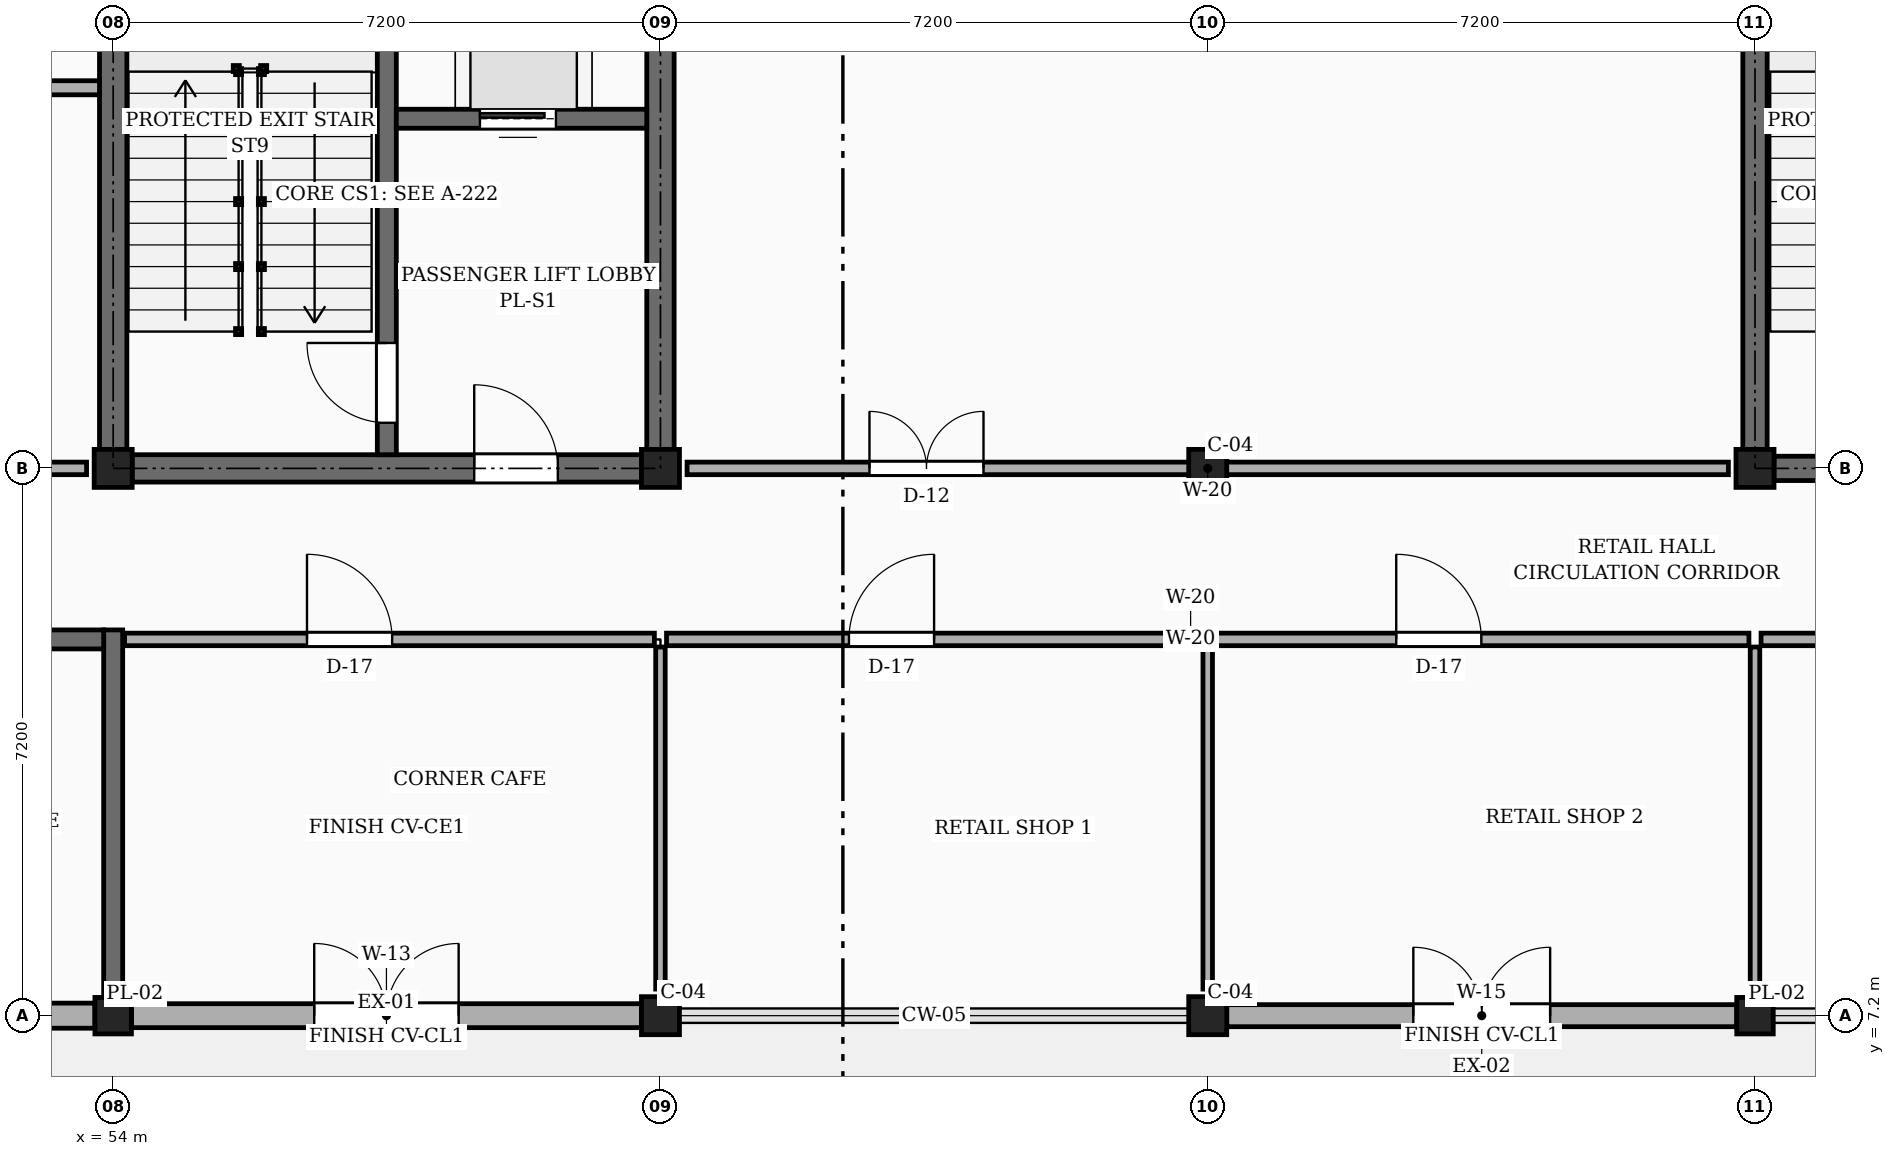
"""IFC4 building model, lengths in metres.
Left out: names, types, materials, properties, quantities, classifications, styles, units other than length and angle.
Written with IfcOpenShell. Run it as: python <this file> out.ifc"""

import sys

from ifc_helpers import new_model, si_unit, direction, frame, frame_2d, origin, origin_2d, place, context, subcontext, project, spatial, rectangle, extrude, element, fill, save


model = new_model("IFC4")
c1 = context("Model", 3, precision=1e-05, world=origin(), true_north=direction((0.0, 1.0)))
c2 = subcontext(c1, "Body", "Model", "MODEL_VIEW")
j1 = project(units=[si_unit("LENGTHUNIT", "METRE"), si_unit("PLANEANGLEUNIT", "RADIAN")], contexts=[c1])
p1 = place(None, origin())
s1 = spatial("IfcSite", under=j1, at=p1, CompositionType="ELEMENT")
p2 = place(p1, origin())
s2 = spatial("IfcBuilding", under=s1, at=p2, CompositionType="ELEMENT")
p3 = place(p2, origin())
s3 = spatial("IfcBuildingStorey", under=s2, at=p3, CompositionType="ELEMENT", Elevation=0.0)
p4 = place(p3, frame((54.0, 7.2, 0.0), z_axis=(0.0, 0.0, 1.0), x_axis=(1.0, 0.0, 0.0)))
e1 = element("IfcColumn", 1, at=p4, inside=s3, PredefinedType="PILASTER", context=c2, shape_type="SweptSolid", body=[
    extrude(rectangle(XDim=0.48, YDim=0.48, at=origin_2d()), origin(), (0.0, 0.0, 1.0), 4.5),
])
for number, where, z_axis, x_axis in (
    (2, (54.0, 14.4, 0.0), (0.0, 0.0, 1.0), (1.0, 0.0, 0.0)),
    (3, (61.2, 7.2, 0.0), (0.0, 0.0, 1.0), (1.0, 0.0, 0.0)),
    (4, (61.2, 14.4, 0.0), (0.0, 0.0, 1.0), (1.0, 0.0, 0.0)),
    (5, (68.4, 7.2, 0.0), (0.0, 0.0, 1.0), (1.0, 0.0, 0.0)),
    (6, (68.4, 14.4, 0.0), (0.0, 0.0, 1.0), (1.0, 0.0, 0.0)),
):
    element("IfcColumn", number, at=place(p3, frame(where, z_axis=z_axis, x_axis=x_axis)), inside=s3, PredefinedType="COLUMN", context=c2, shape_type="SweptSolid", body=[
        extrude(rectangle(XDim=0.5, YDim=0.5, at=origin_2d()), origin(), (0.0, 0.0, 1.0), 4.5),
    ])
p5 = place(p3, frame((75.6, 7.2, 0.0), z_axis=(0.0, 0.0, 1.0), x_axis=(1.0, 0.0, 0.0)))
e7 = element("IfcColumn", 7, at=p5, inside=s3, PredefinedType="PILASTER", context=c2, shape_type="SweptSolid", body=[
    extrude(rectangle(XDim=0.48, YDim=0.48, at=origin_2d()), origin(), (0.0, 0.0, 1.0), 4.5),
])
p6 = place(p3, frame((75.6, 14.4, 0.0), z_axis=(0.0, 0.0, 1.0), x_axis=(1.0, 0.0, 0.0)))
e8 = element("IfcColumn", 8, at=p6, inside=s3, PredefinedType="COLUMN", context=c2, shape_type="SweptSolid", body=[
    extrude(rectangle(XDim=0.5, YDim=0.5, at=origin_2d()), origin(), (0.0, 0.0, 1.0), 4.5),
])
p7 = place(p3, frame((47.05, 7.2, 0.0), z_axis=(0.0, 0.0, 1.0), x_axis=(1.0, 0.0, 0.0)))
e9 = element("IfcWall", 9, at=p7, inside=s3, PredefinedType="SOLIDWALL", context=c2, shape_type="SweptSolid", body=[
    extrude(rectangle(XDim=6.71, YDim=0.33, at=frame_2d((3.355, 0.0))), origin(), (0.0, 0.0, 1.0), 3.83),
])
p8 = place(p7, frame((2.5, 0.0, 0.0)))
e10 = element("IfcOpeningElement", 10, at=p8, cuts=e9, PredefinedType="OPENING", context=c2, shape_type="SweptSolid", body=[
    extrude(rectangle(XDim=1.06, YDim=2.15, at=frame_2d((0.53, 1.075))), frame((0.0, 0.175, 0.0), z_axis=(0.0, -1.0, 0.0), x_axis=(1.0, 0.0, 0.0)), (0.0, 0.0, 1.0), 0.35),
])
p9 = place(p3, frame((54.24, 7.2, 0.0), z_axis=(0.0, 0.0, 1.0), x_axis=(1.0, 0.0, 0.0)))
e11 = element("IfcWall", 11, at=p9, inside=s3, PredefinedType="SOLIDWALL", context=c2, shape_type="SweptSolid", body=[
    extrude(rectangle(XDim=6.71, YDim=0.315, at=frame_2d((3.355, 0.0))), origin(), (0.0, 0.0, 1.0), 3.83),
])
p10 = place(p9, frame((2.405, 0.0, 0.0)))
e12 = element("IfcOpeningElement", 12, at=p10, cuts=e11, PredefinedType="OPENING", context=c2, shape_type="SweptSolid", body=[
    extrude(rectangle(XDim=1.9, YDim=2.2, at=frame_2d((0.95, 1.1))), frame((0.0, 0.167, 0.0), z_axis=(0.0, -1.0, 0.0), x_axis=(1.0, 0.0, 0.0)), (0.0, 0.0, 1.0), 0.335),
])
p11 = place(p3, frame((68.65, 7.2, 0.0), z_axis=(0.0, 0.0, 1.0), x_axis=(1.0, 0.0, 0.0)))
e13 = element("IfcWall", 13, at=p11, inside=s3, PredefinedType="SOLIDWALL", context=c2, shape_type="SweptSolid", body=[
    extrude(rectangle(XDim=6.71, YDim=0.29, at=frame_2d((3.355, 0.0))), origin(), (0.0, 0.0, 1.0), 3.83),
])
p12 = place(p11, frame((2.455, 0.0, 0.0)))
e14 = element("IfcOpeningElement", 14, at=p12, cuts=e13, PredefinedType="OPENING", context=c2, shape_type="SweptSolid", body=[
    extrude(rectangle(XDim=1.8, YDim=2.2, at=frame_2d((0.9, 1.1))), frame((0.0, 0.155, 0.0), z_axis=(0.0, -1.0, 0.0), x_axis=(1.0, 0.0, 0.0)), (0.0, 0.0, 1.0), 0.31),
])
p13 = place(p3, frame((54.0, 14.65, 0.0), z_axis=(0.0, 0.0, 1.0), x_axis=(0.0, 1.0, 0.0)))
e15 = element("IfcWall", 15, at=p13, inside=s3, PredefinedType="SHEAR", context=c2, shape_type="SweptSolid", body=[
    extrude(rectangle(XDim=6.7, YDim=0.36, at=frame_2d((3.35, 0.0))), origin(), (0.0, 0.0, 1.0), 4.26),
])
p14 = place(p13, frame((5.335, 0.0, 0.0)))
e16 = element("IfcOpeningElement", 16, at=p14, cuts=e15, PredefinedType="OPENING", context=c2, shape_type="SweptSolid", body=[
    extrude(rectangle(XDim=1.0, YDim=2.15, at=frame_2d((0.5, 1.075))), frame((0.0, 0.19, 0.0), z_axis=(0.0, -1.0, 0.0), x_axis=(1.0, 0.0, 0.0)), (0.0, 0.0, 1.0), 0.38),
])
p15 = place(p3, frame((61.2, 14.65, 0.0), z_axis=(0.0, 0.0, 1.0), x_axis=(0.0, 1.0, 0.0)))
e17 = element("IfcWall", 17, at=p15, inside=s3, PredefinedType="SHEAR", context=c2, shape_type="SweptSolid", body=[
    extrude(rectangle(XDim=6.7, YDim=0.36, at=frame_2d((3.35, 0.0))), origin(), (0.0, 0.0, 1.0), 4.26),
])
p16 = place(p3, frame((54.25, 14.4, 0.0), z_axis=(0.0, 0.0, 1.0), x_axis=(1.0, 0.0, 0.0)))
e18 = element("IfcWall", 18, at=p16, inside=s3, PredefinedType="SHEAR", context=c2, shape_type="SweptSolid", body=[
    extrude(rectangle(XDim=6.7, YDim=0.36, at=frame_2d((3.35, 0.0))), origin(), (0.0, 0.0, 1.0), 4.26),
])
p17 = place(p16, frame((4.5, 0.0, 0.0)))
e19 = element("IfcOpeningElement", 19, at=p17, cuts=e18, PredefinedType="OPENING", context=c2, shape_type="SweptSolid", body=[
    extrude(rectangle(XDim=1.1, YDim=2.15, at=frame_2d((0.55, 1.075))), frame((0.0, 0.19, 0.0), z_axis=(0.0, -1.0, 0.0), x_axis=(1.0, 0.0, 0.0)), (0.0, 0.0, 1.0), 0.38),
])
p18 = place(p3, frame((57.6, 14.58, 0.0), z_axis=(0.0, 0.0, 1.0), x_axis=(0.0, 1.0, 0.0)))
e20 = element("IfcWall", 20, at=p18, inside=s3, PredefinedType="SHEAR", context=c2, shape_type="SweptSolid", body=[
    extrude(rectangle(XDim=6.84, YDim=0.25, at=frame_2d((3.42, 0.0))), origin(), (0.0, 0.0, 1.0), 4.26),
])
p19 = place(p18, frame((0.42, 0.0, 0.0)))
e21 = element("IfcOpeningElement", 21, at=p19, cuts=e20, PredefinedType="OPENING", context=c2, shape_type="SweptSolid", body=[
    extrude(rectangle(XDim=1.05, YDim=2.15, at=frame_2d((0.525, 1.075))), frame((0.0, 0.135, 0.0), z_axis=(0.0, -1.0, 0.0), x_axis=(1.0, 0.0, 0.0)), (0.0, 0.0, 1.0), 0.27),
])
p20 = place(p3, frame((57.725, 19.0, 0.0), z_axis=(0.0, 0.0, 1.0), x_axis=(1.0, 0.0, 0.0)))
e22 = element("IfcWall", 22, at=p20, inside=s3, PredefinedType="SHEAR", context=c2, shape_type="SweptSolid", body=[
    extrude(rectangle(XDim=3.295, YDim=0.25, at=frame_2d((1.647, 0.0))), origin(), (0.0, 0.0, 1.0), 4.26),
])
p21 = place(p20, frame((1.1, 0.0, 0.0)))
e23 = element("IfcOpeningElement", 23, at=p21, cuts=e22, PredefinedType="OPENING", context=c2, shape_type="SweptSolid", body=[
    extrude(rectangle(XDim=1.0, YDim=2.2, at=frame_2d((0.5, 1.1))), frame((0.0, 0.135, 0.0), z_axis=(0.0, -1.0, 0.0), x_axis=(1.0, 0.0, 0.0)), (0.0, 0.0, 1.0), 0.27),
])
p22 = place(p3, frame((75.6, 14.65, 0.0), z_axis=(0.0, 0.0, 1.0), x_axis=(0.0, 1.0, 0.0)))
e24 = element("IfcWall", 24, at=p22, inside=s3, PredefinedType="SHEAR", context=c2, shape_type="SweptSolid", body=[
    extrude(rectangle(XDim=6.7, YDim=0.32, at=frame_2d((3.35, 0.0))), origin(), (0.0, 0.0, 1.0), 4.26),
])
p23 = place(p3, frame((75.85, 14.4, 0.0), z_axis=(0.0, 0.0, 1.0), x_axis=(1.0, 0.0, 0.0)))
e25 = element("IfcWall", 25, at=p23, inside=s3, PredefinedType="SHEAR", context=c2, shape_type="SweptSolid", body=[
    extrude(rectangle(XDim=3.19, YDim=0.32, at=frame_2d((1.595, 0.0))), origin(), (0.0, 0.0, 1.0), 4.26),
])
p24 = place(p23, frame((1.0, 0.0, 0.0)))
e26 = element("IfcOpeningElement", 26, at=p24, cuts=e25, PredefinedType="OPENING", context=c2, shape_type="SweptSolid", body=[
    extrude(rectangle(XDim=1.05, YDim=2.15, at=frame_2d((0.525, 1.075))), frame((0.0, 0.17, 0.0), z_axis=(0.0, -1.0, 0.0), x_axis=(1.0, 0.0, 0.0)), (0.0, 0.0, 1.0), 0.34),
])
p25 = place(p3, frame((54.0, 7.45, 0.0), z_axis=(0.0, 0.0, 1.0), x_axis=(0.0, 1.0, 0.0)))
e27 = element("IfcWall", 27, at=p25, inside=s3, PredefinedType="SHEAR", context=c2, shape_type="SweptSolid", body=[
    extrude(rectangle(XDim=4.825, YDim=0.25, at=frame_2d((2.413, 0.0))), origin(), (0.0, 0.0, 1.0), 3.41),
])
p26 = place(p3, frame((46.975, 12.15, 0.0), z_axis=(0.0, 0.0, 1.0), x_axis=(1.0, 0.0, 0.0)))
e28 = element("IfcWall", 28, at=p26, inside=s3, PredefinedType="SHEAR", context=c2, shape_type="SweptSolid", body=[
    extrude(rectangle(XDim=6.9, YDim=0.25, at=frame_2d((3.45, 0.0))), origin(), (0.0, 0.0, 1.0), 3.41),
])
p27 = place(p26, frame((2.4, 0.0, 0.0)))
e29 = element("IfcOpeningElement", 29, at=p27, cuts=e28, PredefinedType="OPENING", context=c2, shape_type="SweptSolid", body=[
    extrude(rectangle(XDim=1.0, YDim=2.15, at=frame_2d((0.5, 1.075))), frame((0.0, 0.135, 0.0), z_axis=(0.0, -1.0, 0.0), x_axis=(1.0, 0.0, 0.0)), (0.0, 0.0, 1.0), 0.27),
])
p28 = place(p3, frame((54.15, 12.15, 0.0), z_axis=(0.0, 0.0, 1.0), x_axis=(1.0, 0.0, 0.0)))
e30 = element("IfcWall", 30, at=p28, inside=s3, PredefinedType="PARTITIONING", context=c2, shape_type="SweptSolid", body=[
    extrude(rectangle(XDim=6.97, YDim=0.165, at=frame_2d((3.485, 0.0))), origin(), (0.0, 0.0, 1.0), 3.41),
])
p29 = place(p28, frame((2.4, 0.0, 0.0)))
e31 = element("IfcOpeningElement", 31, at=p29, cuts=e30, PredefinedType="OPENING", context=c2, shape_type="SweptSolid", body=[
    extrude(rectangle(XDim=1.12, YDim=2.18, at=frame_2d((0.56, 1.09))), frame((0.0, 0.093, 0.0), z_axis=(0.0, -1.0, 0.0), x_axis=(1.0, 0.0, 0.0)), (0.0, 0.0, 1.0), 0.185),
])
p30 = place(p3, frame((61.28, 12.15, 0.0), z_axis=(0.0, 0.0, 1.0), x_axis=(1.0, 0.0, 0.0)))
e32 = element("IfcWall", 32, at=p30, inside=s3, PredefinedType="PARTITIONING", context=c2, shape_type="SweptSolid", body=[
    extrude(rectangle(XDim=7.04, YDim=0.165, at=frame_2d((3.52, 0.0))), origin(), (0.0, 0.0, 1.0), 3.41),
])
p31 = place(p30, frame((2.4, 0.0, 0.0)))
e33 = element("IfcOpeningElement", 33, at=p31, cuts=e32, PredefinedType="OPENING", context=c2, shape_type="SweptSolid", body=[
    extrude(rectangle(XDim=1.12, YDim=2.18, at=frame_2d((0.56, 1.09))), frame((0.0, 0.093, 0.0), z_axis=(0.0, -1.0, 0.0), x_axis=(1.0, 0.0, 0.0)), (0.0, 0.0, 1.0), 0.185),
])
p32 = place(p3, frame((68.48, 12.15, 0.0), z_axis=(0.0, 0.0, 1.0), x_axis=(1.0, 0.0, 0.0)))
e34 = element("IfcWall", 34, at=p32, inside=s3, PredefinedType="PARTITIONING", context=c2, shape_type="SweptSolid", body=[
    extrude(rectangle(XDim=7.04, YDim=0.165, at=frame_2d((3.52, 0.0))), origin(), (0.0, 0.0, 1.0), 3.41),
])
p33 = place(p32, frame((2.4, 0.0, 0.0)))
e35 = element("IfcOpeningElement", 35, at=p33, cuts=e34, PredefinedType="OPENING", context=c2, shape_type="SweptSolid", body=[
    extrude(rectangle(XDim=1.12, YDim=2.18, at=frame_2d((0.56, 1.09))), frame((0.0, 0.093, 0.0), z_axis=(0.0, -1.0, 0.0), x_axis=(1.0, 0.0, 0.0)), (0.0, 0.0, 1.0), 0.185),
])
p34 = place(p3, frame((75.68, 12.15, 0.0), z_axis=(0.0, 0.0, 1.0), x_axis=(1.0, 0.0, 0.0)))
e36 = element("IfcWall", 36, at=p34, inside=s3, PredefinedType="PARTITIONING", context=c2, shape_type="SweptSolid", body=[
    extrude(rectangle(XDim=7.04, YDim=0.165, at=frame_2d((3.52, 0.0))), origin(), (0.0, 0.0, 1.0), 3.41),
])
p35 = place(p34, frame((2.4, 0.0, 0.0)))
e37 = element("IfcOpeningElement", 37, at=p35, cuts=e36, PredefinedType="OPENING", context=c2, shape_type="SweptSolid", body=[
    extrude(rectangle(XDim=1.12, YDim=2.18, at=frame_2d((0.56, 1.09))), frame((0.0, 0.093, 0.0), z_axis=(0.0, -1.0, 0.0), x_axis=(1.0, 0.0, 0.0)), (0.0, 0.0, 1.0), 0.185),
])
for number, where, z_axis, x_axis in (
    (38, (61.2, 7.55, 0.0), (0.0, 0.0, 1.0), (0.0, 1.0, 0.0)),
    (39, (68.4, 7.55, 0.0), (0.0, 0.0, 1.0), (0.0, 1.0, 0.0)),
    (40, (75.6, 7.55, 0.0), (0.0, 0.0, 1.0), (0.0, 1.0, 0.0)),
):
    element("IfcWall", number, at=place(p3, frame(where, z_axis=z_axis, x_axis=x_axis)), inside=s3, PredefinedType="PARTITIONING", context=c2, shape_type="SweptSolid", body=[
        extrude(rectangle(XDim=4.5, YDim=0.125, at=frame_2d((2.25, 0.0))), origin(), (0.0, 0.0, 1.0), 3.41),
    ])
p36 = place(p3, frame((47.15, 14.4, 0.0), z_axis=(0.0, 0.0, 1.0), x_axis=(1.0, 0.0, 0.0)))
e41 = element("IfcWall", 41, at=p36, inside=s3, PredefinedType="PARTITIONING", context=c2, shape_type="SweptSolid", body=[
    extrude(rectangle(XDim=6.5, YDim=0.165, at=frame_2d((3.25, 0.0))), origin(), (0.0, 0.0, 1.0), 3.41),
])
p37 = place(p36, frame((2.4, 0.0, 0.0)))
e42 = element("IfcOpeningElement", 42, at=p37, cuts=e41, PredefinedType="OPENING", context=c2, shape_type="SweptSolid", body=[
    extrude(rectangle(XDim=1.02, YDim=2.15, at=frame_2d((0.51, 1.075))), frame((0.0, 0.093, 0.0), z_axis=(0.0, -1.0, 0.0), x_axis=(1.0, 0.0, 0.0)), (0.0, 0.0, 1.0), 0.185),
])
p38 = place(p3, frame((61.55, 14.4, 0.0), z_axis=(0.0, 0.0, 1.0), x_axis=(1.0, 0.0, 0.0)))
e43 = element("IfcWall", 43, at=p38, inside=s3, PredefinedType="PARTITIONING", context=c2, shape_type="SweptSolid", body=[
    extrude(rectangle(XDim=13.7, YDim=0.165, at=frame_2d((6.85, 0.0))), origin(), (0.0, 0.0, 1.0), 3.41),
])
p39 = place(p38, frame((2.4, 0.0, 0.0)))
e44 = element("IfcOpeningElement", 44, at=p39, cuts=e43, PredefinedType="OPENING", context=c2, shape_type="SweptSolid", body=[
    extrude(rectangle(XDim=1.5, YDim=2.25, at=frame_2d((0.75, 1.125))), frame((0.0, 0.093, 0.0), z_axis=(0.0, -1.0, 0.0), x_axis=(1.0, 0.0, 0.0)), (0.0, 0.0, 1.0), 0.185),
])
p40 = place(p3, frame((46.96, 19.407, 0.0), z_axis=(0.0, 0.0, 1.0), x_axis=(1.0, 0.0, 0.0)))
e45 = element("IfcWall", 45, at=p40, inside=s3, PredefinedType="PARTITIONING", context=c2, shape_type="SweptSolid", body=[
    extrude(rectangle(XDim=6.86, YDim=0.185, at=frame_2d((3.43, 0.0))), origin(), (0.0, 0.0, 1.0), 3.41),
])
p41 = place(p10, frame((1.9, 0.0, 0.0), z_axis=(0.0, 0.0, 1.0), x_axis=(-1.0, 0.0, 0.0)))
e46 = element("IfcDoor", 46, at=p41, inside=s3, OperationType="DOUBLE_DOOR_SINGLE_SWING", PredefinedType="DOOR", context=c2, shape_type="SweptSolid", body=[
    extrude(rectangle(XDim=1.9, YDim=2.2, at=frame_2d((0.95, 1.1))), frame((0.0, 0.025, 0.0), z_axis=(0.0, -1.0, 0.0), x_axis=(1.0, 0.0, 0.0)), (0.0, 0.0, 1.0), 0.05),
])
fill(e12, e46)
p42 = place(p12, frame((1.8, 0.0, 0.0), z_axis=(0.0, 0.0, 1.0), x_axis=(-1.0, 0.0, 0.0)))
e47 = element("IfcDoor", 47, at=p42, inside=s3, OperationType="DOUBLE_DOOR_SINGLE_SWING", PredefinedType="DOOR", context=c2, shape_type="SweptSolid", body=[
    extrude(rectangle(XDim=1.8, YDim=2.2, at=frame_2d((0.9, 1.1))), frame((0.0, 0.025, 0.0), z_axis=(0.0, -1.0, 0.0), x_axis=(1.0, 0.0, 0.0)), (0.0, 0.0, 1.0), 0.05),
])
fill(e14, e47)
p43 = place(p17, frame((1.1, 0.0, 0.0), z_axis=(0.0, 0.0, 1.0), x_axis=(-1.0, 0.0, 0.0)))
e48 = element("IfcDoor", 48, at=p43, inside=s3, OperationType="SINGLE_SWING_LEFT", PredefinedType="DOOR", context=c2, shape_type="SweptSolid", body=[
    extrude(rectangle(XDim=1.1, YDim=2.15, at=frame_2d((0.55, 1.075))), frame((0.0, 0.025, 0.0), z_axis=(0.0, -1.0, 0.0), x_axis=(1.0, 0.0, 0.0)), (0.0, 0.0, 1.0), 0.05),
])
fill(e19, e48)
p44 = place(p19, frame((1.05, 0.0, 0.0), z_axis=(0.0, 0.0, 1.0), x_axis=(-1.0, 0.0, 0.0)))
e49 = element("IfcDoor", 49, at=p44, inside=s3, OperationType="SINGLE_SWING_RIGHT", PredefinedType="DOOR", context=c2, shape_type="SweptSolid", body=[
    extrude(rectangle(XDim=1.05, YDim=2.15, at=frame_2d((0.525, 1.075))), frame((0.0, 0.025, 0.0), z_axis=(0.0, -1.0, 0.0), x_axis=(1.0, 0.0, 0.0)), (0.0, 0.0, 1.0), 0.05),
])
fill(e21, e49)
p45 = place(p21, origin())
e50 = element("IfcDoor", 50, at=p45, inside=s3, OperationType="SLIDING_TO_LEFT", PredefinedType="DOOR", context=c2, shape_type="SweptSolid", body=[
    extrude(rectangle(XDim=1.0, YDim=2.2, at=frame_2d((0.5, 1.1))), frame((0.0, 0.025, 0.0), z_axis=(0.0, -1.0, 0.0), x_axis=(1.0, 0.0, 0.0)), (0.0, 0.0, 1.0), 0.05),
])
fill(e23, e50)
p46 = place(p29, origin())
e51 = element("IfcDoor", 51, at=p46, inside=s3, OperationType="SINGLE_SWING_LEFT", PredefinedType="DOOR", context=c2, shape_type="SweptSolid", body=[
    extrude(rectangle(XDim=1.12, YDim=2.18, at=frame_2d((0.56, 1.09))), frame((0.0, 0.025, 0.0), z_axis=(0.0, -1.0, 0.0), x_axis=(1.0, 0.0, 0.0)), (0.0, 0.0, 1.0), 0.05),
])
fill(e31, e51)
p47 = place(p31, origin())
e52 = element("IfcDoor", 52, at=p47, inside=s3, OperationType="SINGLE_SWING_RIGHT", PredefinedType="DOOR", context=c2, shape_type="SweptSolid", body=[
    extrude(rectangle(XDim=1.12, YDim=2.18, at=frame_2d((0.56, 1.09))), frame((0.0, 0.025, 0.0), z_axis=(0.0, -1.0, 0.0), x_axis=(1.0, 0.0, 0.0)), (0.0, 0.0, 1.0), 0.05),
])
fill(e33, e52)
p48 = place(p33, origin())
e53 = element("IfcDoor", 53, at=p48, inside=s3, OperationType="SINGLE_SWING_LEFT", PredefinedType="DOOR", context=c2, shape_type="SweptSolid", body=[
    extrude(rectangle(XDim=1.12, YDim=2.18, at=frame_2d((0.56, 1.09))), frame((0.0, 0.025, 0.0), z_axis=(0.0, -1.0, 0.0), x_axis=(1.0, 0.0, 0.0)), (0.0, 0.0, 1.0), 0.05),
])
fill(e35, e53)
p49 = place(p39, origin())
e54 = element("IfcDoor", 54, at=p49, inside=s3, OperationType="DOUBLE_DOOR_SINGLE_SWING", PredefinedType="DOOR", context=c2, shape_type="SweptSolid", body=[
    extrude(rectangle(XDim=1.5, YDim=2.25, at=frame_2d((0.75, 1.125))), frame((0.0, 0.025, 0.0), z_axis=(0.0, -1.0, 0.0), x_axis=(1.0, 0.0, 0.0)), (0.0, 0.0, 1.0), 0.05),
])
fill(e44, e54)
save(model, sys.argv[1])
